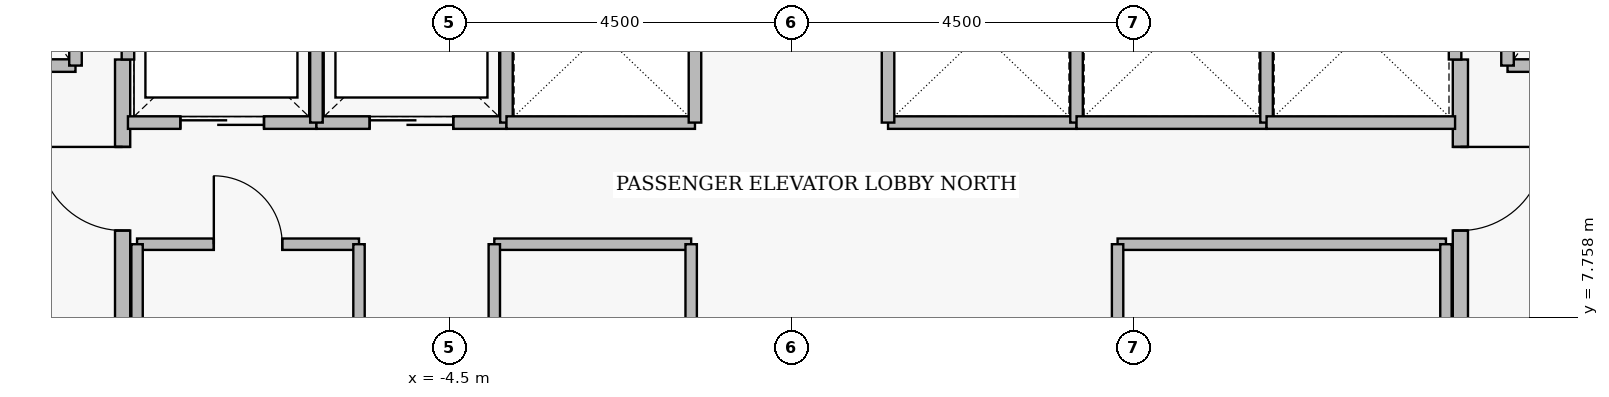
"""IFC4 building model, lengths in metres.
Left out: names, types, materials, properties, quantities, classifications, styles, units other than length and angle.
Written with IfcOpenShell. Run it as: python <this file> out.ifc"""

import sys

from ifc_helpers import new_model, si_unit, direction, frame, frame_2d, origin, place, context, subcontext, project, spatial, rectangle, extrude, element, fill, save


model = new_model("IFC4")
c1 = context("Model", 3, precision=1e-05, world=origin(), true_north=direction((0.0, 1.0)))
c2 = subcontext(c1, "Body", "Model", "MODEL_VIEW")
j1 = project(units=[si_unit("LENGTHUNIT", "METRE"), si_unit("PLANEANGLEUNIT", "RADIAN")], contexts=[c1])
p1 = place(None, origin())
s1 = spatial("IfcSite", under=j1, at=p1, CompositionType="ELEMENT")
p2 = place(p1, origin())
s2 = spatial("IfcBuilding", under=s1, at=p2, CompositionType="ELEMENT")
p3 = place(p2, frame((0.0, 0.0, 117.55)))
s3 = spatial("IfcBuildingStorey", under=s2, at=p3, CompositionType="ELEMENT", Elevation=117.55)
p4 = place(p3, frame((-8.8, 5.05, 0.0), z_axis=(0.0, 0.0, 1.0), x_axis=(0.0, 1.0, 0.0)))
e1 = element("IfcWall", 1, at=p4, inside=s3, PredefinedType="PARTITIONING", context=c2, shape_type="SweptSolid", body=[
    extrude(rectangle(XDim=6.1, YDim=0.2, at=frame_2d((3.05, 0.0))), origin(), (0.0, 0.0, 1.0), 3.43),
])
p5 = place(p4, frame((0.25, 0.0, 0.0)))
e2 = element("IfcOpeningElement", 2, at=p5, cuts=e1, PredefinedType="OPENING", context=c2, shape_type="SweptSolid", body=[
    extrude(rectangle(XDim=1.1, YDim=2.2, at=frame_2d((0.55, 1.1))), frame((0.0, 0.11, 0.0), z_axis=(0.0, -1.0, 0.0), x_axis=(1.0, 0.0, 0.0)), (0.0, 0.0, 1.0), 0.22),
])
p6 = place(p4, frame((3.85, 0.0, 0.0)))
e3 = element("IfcOpeningElement", 3, at=p6, cuts=e1, PredefinedType="OPENING", context=c2, shape_type="SweptSolid", body=[
    extrude(rectangle(XDim=1.1, YDim=2.2, at=frame_2d((0.55, 1.1))), frame((0.0, 0.11, 0.0), z_axis=(0.0, -1.0, 0.0), x_axis=(1.0, 0.0, 0.0)), (0.0, 0.0, 1.0), 0.22),
])
p7 = place(p3, frame((8.8, 11.15, 0.0), z_axis=(0.0, 0.0, 1.0), x_axis=(0.0, -1.0, 0.0)))
e4 = element("IfcWall", 4, at=p7, inside=s3, PredefinedType="PARTITIONING", context=c2, shape_type="SweptSolid", body=[
    extrude(rectangle(XDim=6.1, YDim=0.2, at=frame_2d((3.05, 0.0))), origin(), (0.0, 0.0, 1.0), 3.43),
])
p8 = place(p7, frame((1.15, 0.0, 0.0)))
e5 = element("IfcOpeningElement", 5, at=p8, cuts=e4, PredefinedType="OPENING", context=c2, shape_type="SweptSolid", body=[
    extrude(rectangle(XDim=1.1, YDim=2.2, at=frame_2d((0.55, 1.1))), frame((0.0, 0.11, 0.0), z_axis=(0.0, -1.0, 0.0), x_axis=(1.0, 0.0, 0.0)), (0.0, 0.0, 1.0), 0.22),
])
p9 = place(p7, frame((4.75, 0.0, 0.0)))
e6 = element("IfcOpeningElement", 6, at=p9, cuts=e4, PredefinedType="OPENING", context=c2, shape_type="SweptSolid", body=[
    extrude(rectangle(XDim=1.1, YDim=2.2, at=frame_2d((0.55, 1.1))), frame((0.0, 0.11, 0.0), z_axis=(0.0, -1.0, 0.0), x_axis=(1.0, 0.0, 0.0)), (0.0, 0.0, 1.0), 0.22),
])
p10 = place(p3, frame((-11.58, 11.07, 0.0), z_axis=(0.0, 0.0, 1.0), x_axis=(1.0, 0.0, 0.0)))
e7 = element("IfcWall", 7, at=p10, inside=s3, PredefinedType="PARTITIONING", context=c2, shape_type="SweptSolid", body=[
    extrude(rectangle(XDim=2.16, YDim=0.165, at=frame_2d((1.08, 0.0))), origin(), (0.0, 0.0, 1.0), 3.43),
])
p11 = place(p10, frame((0.53, 0.0, 0.0)))
e8 = element("IfcOpeningElement", 8, at=p11, cuts=e7, PredefinedType="OPENING", context=c2, shape_type="SweptSolid", body=[
    extrude(rectangle(XDim=1.15, YDim=2.25, at=frame_2d((0.575, 1.125))), frame((0.0, 0.093, 0.0), z_axis=(0.0, -1.0, 0.0), x_axis=(1.0, 0.0, 0.0)), (0.0, 0.0, 1.0), 0.185),
])
p12 = place(p3, frame((9.42, 11.07, 0.0), z_axis=(0.0, 0.0, 1.0), x_axis=(1.0, 0.0, 0.0)))
e9 = element("IfcWall", 9, at=p12, inside=s3, PredefinedType="PARTITIONING", context=c2, shape_type="SweptSolid", body=[
    extrude(rectangle(XDim=2.16, YDim=0.165, at=frame_2d((1.08, 0.0))), origin(), (0.0, 0.0, 1.0), 3.43),
])
p13 = place(p12, frame((0.53, 0.0, 0.0)))
e10 = element("IfcOpeningElement", 10, at=p13, cuts=e9, PredefinedType="OPENING", context=c2, shape_type="SweptSolid", body=[
    extrude(rectangle(XDim=1.15, YDim=2.25, at=frame_2d((0.575, 1.125))), frame((0.0, 0.093, 0.0), z_axis=(0.0, -1.0, 0.0), x_axis=(1.0, 0.0, 0.0)), (0.0, 0.0, 1.0), 0.185),
])
p14 = place(p3, frame((-8.73, 10.32, 0.0), z_axis=(0.0, 0.0, 1.0), x_axis=(1.0, 0.0, 0.0)))
e11 = element("IfcWall", 11, at=p14, inside=s3, PredefinedType="PARTITIONING", context=c2, shape_type="SweptSolid", body=[
    extrude(rectangle(XDim=2.48, YDim=0.165, at=frame_2d((1.24, 0.0))), origin(), (0.0, 0.0, 1.0), 3.43),
])
p15 = place(p14, frame((0.69, 0.0, 0.0)))
e12 = element("IfcOpeningElement", 12, at=p15, cuts=e11, PredefinedType="OPENING", context=c2, shape_type="SweptSolid", body=[
    extrude(rectangle(XDim=1.1, YDim=2.25, at=frame_2d((0.55, 1.125))), frame((0.0, 0.093, 0.0), z_axis=(0.0, -1.0, 0.0), x_axis=(1.0, 0.0, 0.0)), (0.0, 0.0, 1.0), 0.185),
])
p16 = place(p3, frame((-6.25, 10.32, 0.0), z_axis=(0.0, 0.0, 1.0), x_axis=(1.0, 0.0, 0.0)))
e13 = element("IfcWall", 13, at=p16, inside=s3, PredefinedType="PARTITIONING", context=c2, shape_type="SweptSolid", body=[
    extrude(rectangle(XDim=2.5, YDim=0.165, at=frame_2d((1.25, 0.0))), origin(), (0.0, 0.0, 1.0), 3.43),
])
p17 = place(p16, frame((0.7, 0.0, 0.0)))
e14 = element("IfcOpeningElement", 14, at=p17, cuts=e13, PredefinedType="OPENING", context=c2, shape_type="SweptSolid", body=[
    extrude(rectangle(XDim=1.1, YDim=2.25, at=frame_2d((0.55, 1.125))), frame((0.0, 0.093, 0.0), z_axis=(0.0, -1.0, 0.0), x_axis=(1.0, 0.0, 0.0)), (0.0, 0.0, 1.0), 0.185),
])
p18 = place(p3, frame((-8.61, 8.72, 0.0), z_axis=(0.0, 0.0, 1.0), x_axis=(1.0, 0.0, 0.0)))
e15 = element("IfcWall", 15, at=p18, inside=s3, PredefinedType="PARTITIONING", context=c2, shape_type="SweptSolid", body=[
    extrude(rectangle(XDim=2.92, YDim=0.15, at=frame_2d((1.46, 0.0))), origin(), (0.0, 0.0, 1.0), 3.43),
])
p19 = place(p18, frame((1.01, 0.0, 0.0)))
e16 = element("IfcOpeningElement", 16, at=p19, cuts=e15, PredefinedType="OPENING", context=c2, shape_type="SweptSolid", body=[
    extrude(rectangle(XDim=0.9, YDim=2.15, at=frame_2d((0.45, 1.075))), frame((0.0, 0.085, 0.0), z_axis=(0.0, -1.0, 0.0), x_axis=(1.0, 0.0, 0.0)), (0.0, 0.0, 1.0), 0.17),
])
for number, where, z_axis, x_axis in (
    (17, (-9.42, 11.07, 0.0), (0.0, 0.0, 1.0), (0.0, 1.0, 0.0)),
    (18, (9.42, 11.07, 0.0), (0.0, 0.0, 1.0), (0.0, 1.0, 0.0)),
):
    element("IfcWall", number, at=place(p3, frame(where, z_axis=z_axis, x_axis=x_axis)), inside=s3, PredefinedType="PARTITIONING", context=c2, shape_type="SweptSolid", body=[
        extrude(rectangle(XDim=2.96, YDim=0.165, at=frame_2d((1.48, 0.0))), origin(), (0.0, 0.0, 1.0), 3.43),
    ])
p20 = place(p3, frame((-8.73, 11.15, 0.0), z_axis=(0.0, 0.0, 1.0), x_axis=(0.0, 1.0, 0.0)))
e19 = element("IfcWall", 19, at=p20, inside=s3, PredefinedType="PARTITIONING", context=c2, shape_type="SweptSolid", body=[
    extrude(rectangle(XDim=1.53, YDim=0.165, at=frame_2d((0.765, 0.0))), origin(), (0.0, 0.0, 1.0), 3.43),
])
for number, where, z_axis, x_axis in (
    (20, (-6.25, 10.32, 0.0), (0.0, 0.0, 1.0), (0.0, 1.0, 0.0)),
    (21, (-3.75, 10.32, 0.0), (0.0, 0.0, 1.0), (0.0, 1.0, 0.0)),
):
    element("IfcWall", number, at=place(p3, frame(where, z_axis=z_axis, x_axis=x_axis)), inside=s3, PredefinedType="PARTITIONING", context=c2, shape_type="SweptSolid", body=[
        extrude(rectangle(XDim=2.36, YDim=0.165, at=frame_2d((1.18, 0.0))), origin(), (0.0, 0.0, 1.0), 3.43),
    ])
p21 = place(p3, frame((-3.75, 10.32, 0.0), z_axis=(0.0, 0.0, 1.0), x_axis=(1.0, 0.0, 0.0)))
e22 = element("IfcWall", 22, at=p21, inside=s3, PredefinedType="PARTITIONING", context=c2, shape_type="SweptSolid", body=[
    extrude(rectangle(XDim=2.48, YDim=0.165, at=frame_2d((1.24, 0.0))), origin(), (0.0, 0.0, 1.0), 3.43),
])
p22 = place(p3, frame((-1.27, 10.32, 0.0), z_axis=(0.0, 0.0, 1.0), x_axis=(0.0, 1.0, 0.0)))
e23 = element("IfcWall", 23, at=p22, inside=s3, PredefinedType="PARTITIONING", context=c2, shape_type="SweptSolid", body=[
    extrude(rectangle(XDim=2.36, YDim=0.165, at=frame_2d((1.18, 0.0))), origin(), (0.0, 0.0, 1.0), 3.43),
])
p23 = place(p3, frame((1.27, 10.32, 0.0), z_axis=(0.0, 0.0, 1.0), x_axis=(1.0, 0.0, 0.0)))
e24 = element("IfcWall", 24, at=p23, inside=s3, PredefinedType="PARTITIONING", context=c2, shape_type="SweptSolid", body=[
    extrude(rectangle(XDim=2.48, YDim=0.165, at=frame_2d((1.24, 0.0))), origin(), (0.0, 0.0, 1.0), 3.43),
])
for number, where, z_axis, x_axis in (
    (25, (1.27, 10.32, 0.0), (0.0, 0.0, 1.0), (0.0, 1.0, 0.0)),
    (26, (3.75, 10.32, 0.0), (0.0, 0.0, 1.0), (0.0, 1.0, 0.0)),
):
    element("IfcWall", number, at=place(p3, frame(where, z_axis=z_axis, x_axis=x_axis)), inside=s3, PredefinedType="PARTITIONING", context=c2, shape_type="SweptSolid", body=[
        extrude(rectangle(XDim=2.36, YDim=0.165, at=frame_2d((1.18, 0.0))), origin(), (0.0, 0.0, 1.0), 3.43),
    ])
p24 = place(p3, frame((3.75, 10.32, 0.0), z_axis=(0.0, 0.0, 1.0), x_axis=(1.0, 0.0, 0.0)))
e27 = element("IfcWall", 27, at=p24, inside=s3, PredefinedType="PARTITIONING", context=c2, shape_type="SweptSolid", body=[
    extrude(rectangle(XDim=2.5, YDim=0.165, at=frame_2d((1.25, 0.0))), origin(), (0.0, 0.0, 1.0), 3.43),
])
p25 = place(p3, frame((6.25, 10.32, 0.0), z_axis=(0.0, 0.0, 1.0), x_axis=(0.0, 1.0, 0.0)))
e28 = element("IfcWall", 28, at=p25, inside=s3, PredefinedType="PARTITIONING", context=c2, shape_type="SweptSolid", body=[
    extrude(rectangle(XDim=2.36, YDim=0.165, at=frame_2d((1.18, 0.0))), origin(), (0.0, 0.0, 1.0), 3.43),
])
p26 = place(p3, frame((6.25, 10.32, 0.0), z_axis=(0.0, 0.0, 1.0), x_axis=(1.0, 0.0, 0.0)))
e29 = element("IfcWall", 29, at=p26, inside=s3, PredefinedType="PARTITIONING", context=c2, shape_type="SweptSolid", body=[
    extrude(rectangle(XDim=2.48, YDim=0.165, at=frame_2d((1.24, 0.0))), origin(), (0.0, 0.0, 1.0), 3.43),
])
p27 = place(p3, frame((8.73, 11.15, 0.0), z_axis=(0.0, 0.0, 1.0), x_axis=(0.0, 1.0, 0.0)))
e30 = element("IfcWall", 30, at=p27, inside=s3, PredefinedType="PARTITIONING", context=c2, shape_type="SweptSolid", body=[
    extrude(rectangle(XDim=1.53, YDim=0.165, at=frame_2d((0.765, 0.0))), origin(), (0.0, 0.0, 1.0), 3.43),
])
for number, where, z_axis, x_axis in (
    (31, (-8.61, 6.48, 0.0), (0.0, 0.0, 1.0), (0.0, 1.0, 0.0)),
    (32, (-5.69, 6.48, 0.0), (0.0, 0.0, 1.0), (0.0, 1.0, 0.0)),
):
    element("IfcWall", number, at=place(p3, frame(where, z_axis=z_axis, x_axis=x_axis)), inside=s3, PredefinedType="PARTITIONING", context=c2, shape_type="SweptSolid", body=[
        extrude(rectangle(XDim=2.24, YDim=0.15, at=frame_2d((1.12, 0.0))), origin(), (0.0, 0.0, 1.0), 3.43),
    ])
p28 = place(p3, frame((-3.91, 8.72, 0.0), z_axis=(0.0, 0.0, 1.0), x_axis=(1.0, 0.0, 0.0)))
e33 = element("IfcWall", 33, at=p28, inside=s3, PredefinedType="PARTITIONING", context=c2, shape_type="SweptSolid", body=[
    extrude(rectangle(XDim=2.59, YDim=0.15, at=frame_2d((1.295, 0.0))), origin(), (0.0, 0.0, 1.0), 3.43),
])
for number, where, z_axis, x_axis in (
    (34, (-3.91, 6.48, 0.0), (0.0, 0.0, 1.0), (0.0, 1.0, 0.0)),
    (35, (-1.32, 6.48, 0.0), (0.0, 0.0, 1.0), (0.0, 1.0, 0.0)),
):
    element("IfcWall", number, at=place(p3, frame(where, z_axis=z_axis, x_axis=x_axis)), inside=s3, PredefinedType="PARTITIONING", context=c2, shape_type="SweptSolid", body=[
        extrude(rectangle(XDim=2.24, YDim=0.15, at=frame_2d((1.12, 0.0))), origin(), (0.0, 0.0, 1.0), 3.43),
    ])
p29 = place(p3, frame((4.29, 8.72, 0.0), z_axis=(0.0, 0.0, 1.0), x_axis=(1.0, 0.0, 0.0)))
e36 = element("IfcWall", 36, at=p29, inside=s3, PredefinedType="PARTITIONING", context=c2, shape_type="SweptSolid", body=[
    extrude(rectangle(XDim=4.32, YDim=0.15, at=frame_2d((2.16, 0.0))), origin(), (0.0, 0.0, 1.0), 3.43),
])
for number, where, z_axis, x_axis in (
    (37, (4.29, 6.48, 0.0), (0.0, 0.0, 1.0), (0.0, 1.0, 0.0)),
    (38, (8.61, 6.48, 0.0), (0.0, 0.0, 1.0), (0.0, 1.0, 0.0)),
):
    element("IfcWall", number, at=place(p3, frame(where, z_axis=z_axis, x_axis=x_axis)), inside=s3, PredefinedType="PARTITIONING", context=c2, shape_type="SweptSolid", body=[
        extrude(rectangle(XDim=2.24, YDim=0.15, at=frame_2d((1.12, 0.0))), origin(), (0.0, 0.0, 1.0), 3.43),
    ])
p30 = place(p6, origin())
e39 = element("IfcDoor", 39, at=p30, inside=s3, OperationType="SINGLE_SWING_RIGHT", PredefinedType="DOOR", context=c2, shape_type="SweptSolid", body=[
    extrude(rectangle(XDim=1.1, YDim=2.2, at=frame_2d((0.55, 1.1))), frame((0.0, 0.025, 0.0), z_axis=(0.0, -1.0, 0.0), x_axis=(1.0, 0.0, 0.0)), (0.0, 0.0, 1.0), 0.05),
])
fill(e3, e39)
p31 = place(p8, origin())
e40 = element("IfcDoor", 40, at=p31, inside=s3, OperationType="SINGLE_SWING_LEFT", PredefinedType="DOOR", context=c2, shape_type="SweptSolid", body=[
    extrude(rectangle(XDim=1.1, YDim=2.2, at=frame_2d((0.55, 1.1))), frame((0.0, 0.025, 0.0), z_axis=(0.0, -1.0, 0.0), x_axis=(1.0, 0.0, 0.0)), (0.0, 0.0, 1.0), 0.05),
])
fill(e5, e40)
p32 = place(p15, origin())
e41 = element("IfcDoor", 41, at=p32, inside=s3, OperationType="SLIDING_TO_LEFT", PredefinedType="DOOR", context=c2, shape_type="SweptSolid", body=[
    extrude(rectangle(XDim=1.1, YDim=2.25, at=frame_2d((0.55, 1.125))), frame((0.0, 0.025, 0.0), z_axis=(0.0, -1.0, 0.0), x_axis=(1.0, 0.0, 0.0)), (0.0, 0.0, 1.0), 0.05),
])
fill(e12, e41)
p33 = place(p17, origin())
e42 = element("IfcDoor", 42, at=p33, inside=s3, OperationType="SLIDING_TO_LEFT", PredefinedType="DOOR", context=c2, shape_type="SweptSolid", body=[
    extrude(rectangle(XDim=1.1, YDim=2.25, at=frame_2d((0.55, 1.125))), frame((0.0, 0.025, 0.0), z_axis=(0.0, -1.0, 0.0), x_axis=(1.0, 0.0, 0.0)), (0.0, 0.0, 1.0), 0.05),
])
fill(e14, e42)
p34 = place(p19, origin())
e43 = element("IfcDoor", 43, at=p34, inside=s3, OperationType="SINGLE_SWING_LEFT", PredefinedType="DOOR", context=c2, shape_type="SweptSolid", body=[
    extrude(rectangle(XDim=0.9, YDim=2.15, at=frame_2d((0.45, 1.075))), frame((0.0, 0.025, 0.0), z_axis=(0.0, -1.0, 0.0), x_axis=(1.0, 0.0, 0.0)), (0.0, 0.0, 1.0), 0.05),
])
fill(e16, e43)
save(model, sys.argv[1])
